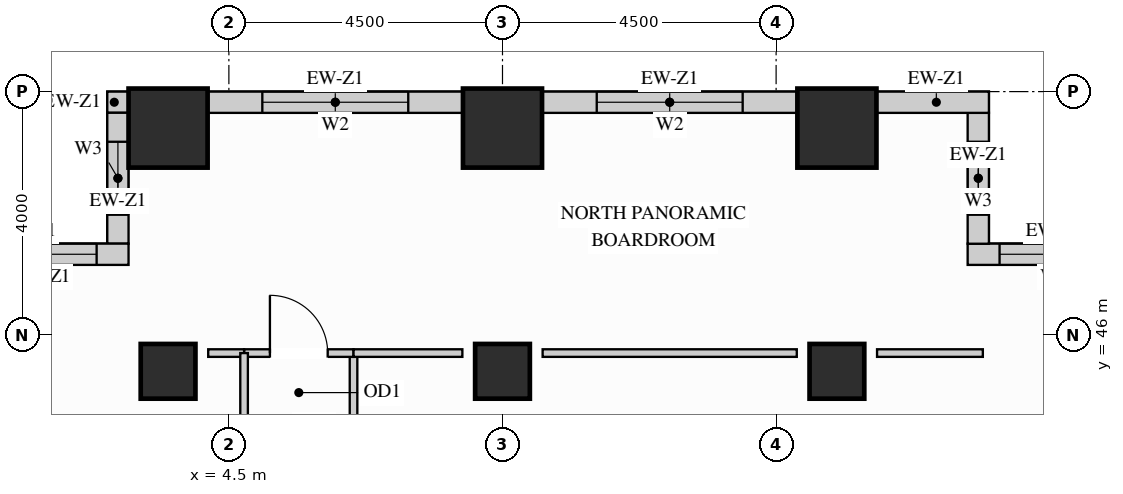
"""IFC4 building model, lengths in metres.
Left out: names, types, materials, properties, quantities, classifications, styles, units other than length and angle.
Written with IfcOpenShell. Run it as: python <this file> out.ifc"""

import sys

from ifc_helpers import new_model, si_unit, direction, frame, frame_2d, origin, origin_2d, place, context, subcontext, project, spatial, rectangle, extrude, source, transform, mapped, element, fill, save


model = new_model("IFC4")
c1 = context("Model", 3, precision=1e-05, world=origin(), true_north=direction((0.0, 1.0)))
c2 = subcontext(c1, "Body", "Model", "MODEL_VIEW")
j1 = project(units=[si_unit("LENGTHUNIT", "METRE"), si_unit("PLANEANGLEUNIT", "RADIAN")], contexts=[c1])
p1 = place(None, origin())
s1 = spatial("IfcSite", under=j1, at=p1, CompositionType="ELEMENT")
p2 = place(p1, origin())
s2 = spatial("IfcBuilding", under=s1, at=p2, CompositionType="ELEMENT")
p3 = place(p2, frame((0.0, 0.0, 65.7)))
s3 = spatial("IfcBuildingStorey", under=s2, at=p3, CompositionType="ELEMENT", Elevation=65.7)
m1 = source(origin(), c2, "Body", "SweptSolid", [
    extrude(rectangle(XDim=0.9, YDim=0.9, at=origin_2d()), origin(), (0.0, 0.0, 1.0), 3.38),
])
for number, where, z_axis, x_axis in (
    (1, (14.5, 45.4, 0.0), (0.0, 0.0, 1.0), (1.0, 0.0, 0.0)),
    (2, (3.5, 45.4, 0.0), (0.0, 0.0, 1.0), (1.0, 0.0, 0.0)),
    (3, (9.0, 45.4, 0.0), (0.0, 0.0, 1.0), (1.0, 0.0, 0.0)),
):
    element("IfcColumn", number, at=place(p3, frame(where, z_axis=z_axis, x_axis=x_axis)), inside=s3, PredefinedType="COLUMN", context=c2, shape_type="MappedRepresentation", body=[
        mapped(m1, transform((0.0, 0.0, 0.0), x_axis=(1.0, 0.0, 0.0), y_axis=(0.0, 1.0, 0.0), z_axis=(0.0, 0.0, 1.0))),
    ])
m2 = source(origin(), c2, "Body", "SweptSolid", [
    extrude(rectangle(XDim=1.3, YDim=1.3, at=origin_2d()), origin(), (0.0, 0.0, 1.0), 3.38),
])
for number, where, z_axis, x_axis in (
    (4, (14.5, 49.4, 0.0), (0.0, 0.0, 1.0), (1.0, 0.0, 0.0)),
    (5, (3.5, 49.4, 0.0), (0.0, 0.0, 1.0), (1.0, 0.0, 0.0)),
    (6, (9.0, 49.4, 0.0), (0.0, 0.0, 1.0), (1.0, 0.0, 0.0)),
):
    element("IfcColumn", number, at=place(p3, frame(where, z_axis=z_axis, x_axis=x_axis)), inside=s3, PredefinedType="COLUMN", context=c2, shape_type="MappedRepresentation", body=[
        mapped(m2, transform((0.0, 0.0, 0.0), x_axis=(1.0, 0.0, 0.0), y_axis=(0.0, 1.0, 0.0), z_axis=(0.0, 0.0, 1.0))),
    ])
p4 = place(p3, frame((19.5, 47.325, 0.0), z_axis=(0.0, 0.0, 1.0), x_axis=(-1.0, 0.0, 0.0)))
e7 = element("IfcWall", 7, at=p4, inside=s3, PredefinedType="SOLIDWALL", context=c2, shape_type="SweptSolid", body=[
    extrude(rectangle(XDim=2.85, YDim=0.35, at=frame_2d((1.425, 0.0))), origin(), (0.0, 0.0, 1.0), 3.365),
])
p5 = place(p4, frame((0.525, 0.0, 0.78)))
e8 = element("IfcOpeningElement", 8, at=p5, cuts=e7, PredefinedType="OPENING", context=c2, shape_type="SweptSolid", body=[
    extrude(rectangle(XDim=1.8, YDim=2.1, at=frame_2d((0.9, 1.05))), frame((0.0, 0.185, 0.0), z_axis=(0.0, -1.0, 0.0), x_axis=(1.0, 0.0, 0.0)), (0.0, 0.0, 1.0), 0.37),
])
p6 = place(p3, frame((16.825, 47.498, 0.0), z_axis=(0.0, 0.0, 1.0), x_axis=(0.0, 1.0, 0.0)))
e9 = element("IfcWall", 9, at=p6, inside=s3, PredefinedType="SOLIDWALL", context=c2, shape_type="SweptSolid", body=[
    extrude(rectangle(XDim=2.154, YDim=0.35, at=frame_2d((1.077, 0.0))), origin(), (0.0, 0.0, 1.0), 3.365),
])
p7 = place(p6, frame((0.477, 0.0, 0.78)))
e10 = element("IfcOpeningElement", 10, at=p7, cuts=e9, PredefinedType="OPENING", context=c2, shape_type="SweptSolid", body=[
    extrude(rectangle(XDim=1.2, YDim=2.1, at=frame_2d((0.6, 1.05))), frame((0.0, 0.185, 0.0), z_axis=(0.0, -1.0, 0.0), x_axis=(1.0, 0.0, 0.0)), (0.0, 0.0, 1.0), 0.37),
])
m3 = source(origin(), c2, "Body", "SweptSolid", [
    extrude(rectangle(XDim=1.852, YDim=0.35, at=frame_2d((0.926, 0.0))), origin(), (0.0, 0.0, 1.0), 3.365),
])
p8 = place(p3, frame((17.0, 49.825, 0.0), z_axis=(0.0, 0.0, 1.0), x_axis=(-1.0, 0.0, 0.0)))
e11 = element("IfcWall", 11, at=p8, inside=s3, PredefinedType="SOLIDWALL", context=c2, shape_type="MappedRepresentation", body=[
    mapped(m3, transform((0.0, 0.0, 0.0), x_axis=(1.0, 0.0, 0.0), y_axis=(0.0, 1.0, 0.0), z_axis=(0.0, 0.0, 1.0))),
])
p9 = place(p3, frame((13.852, 49.825, 0.0), z_axis=(0.0, 0.0, 1.0), x_axis=(-1.0, 0.0, 0.0)))
e12 = element("IfcWall", 12, at=p9, inside=s3, PredefinedType="SOLIDWALL", context=c2, shape_type="SweptSolid", body=[
    extrude(rectangle(XDim=4.204, YDim=0.35, at=frame_2d((2.102, 0.0))), origin(), (0.0, 0.0, 1.0), 2.51),
])
p10 = place(p9, frame((0.902, 0.0, 0.78)))
e13 = element("IfcOpeningElement", 13, at=p10, cuts=e12, PredefinedType="OPENING", context=c2, shape_type="SweptSolid", body=[
    extrude(rectangle(XDim=2.4, YDim=1.55, at=frame_2d((1.2, 0.775))), frame((0.0, 0.185, 0.0), z_axis=(0.0, -1.0, 0.0), x_axis=(1.0, 0.0, 0.0)), (0.0, 0.0, 1.0), 0.37),
])
p11 = place(p3, frame((8.352, 49.825, 0.0), z_axis=(0.0, 0.0, 1.0), x_axis=(-1.0, 0.0, 0.0)))
e14 = element("IfcWall", 14, at=p11, inside=s3, PredefinedType="SOLIDWALL", context=c2, shape_type="SweptSolid", body=[
    extrude(rectangle(XDim=4.204, YDim=0.35, at=frame_2d((2.102, 0.0))), origin(), (0.0, 0.0, 1.0), 2.51),
])
p12 = place(p11, frame((0.902, 0.0, 0.78)))
e15 = element("IfcOpeningElement", 15, at=p12, cuts=e14, PredefinedType="OPENING", context=c2, shape_type="SweptSolid", body=[
    extrude(rectangle(XDim=2.4, YDim=1.55, at=frame_2d((1.2, 0.775))), frame((0.0, 0.185, 0.0), z_axis=(0.0, -1.0, 0.0), x_axis=(1.0, 0.0, 0.0)), (0.0, 0.0, 1.0), 0.37),
])
m4 = source(origin(), c2, "Body", "SweptSolid", [
    extrude(rectangle(XDim=0.352, YDim=0.35, at=frame_2d((0.176, 0.0))), origin(), (0.0, 0.0, 1.0), 3.365),
])
p13 = place(p3, frame((2.852, 49.825, 0.0), z_axis=(0.0, 0.0, 1.0), x_axis=(-1.0, 0.0, 0.0)))
e16 = element("IfcWall", 16, at=p13, inside=s3, PredefinedType="SOLIDWALL", context=c2, shape_type="MappedRepresentation", body=[
    mapped(m4, transform((0.0, 0.0, 0.0), x_axis=(1.0, 0.0, 0.0), y_axis=(0.0, 1.0, 0.0), z_axis=(0.0, 0.0, 1.0))),
])
p14 = place(p3, frame((2.675, 49.652, 0.0), z_axis=(0.0, 0.0, 1.0), x_axis=(0.0, -1.0, 0.0)))
e17 = element("IfcWall", 17, at=p14, inside=s3, PredefinedType="SOLIDWALL", context=c2, shape_type="SweptSolid", body=[
    extrude(rectangle(XDim=2.154, YDim=0.35, at=frame_2d((1.077, 0.0))), origin(), (0.0, 0.0, 1.0), 3.365),
])
p15 = place(p14, frame((0.477, 0.0, 0.78)))
e18 = element("IfcOpeningElement", 18, at=p15, cuts=e17, PredefinedType="OPENING", context=c2, shape_type="SweptSolid", body=[
    extrude(rectangle(XDim=1.2, YDim=2.1, at=frame_2d((0.6, 1.05))), frame((0.0, 0.185, 0.0), z_axis=(0.0, -1.0, 0.0), x_axis=(1.0, 0.0, 0.0)), (0.0, 0.0, 1.0), 0.37),
])
p16 = place(p3, frame((2.85, 47.325, 0.0), z_axis=(0.0, 0.0, 1.0), x_axis=(-1.0, 0.0, 0.0)))
e19 = element("IfcWall", 19, at=p16, inside=s3, PredefinedType="SOLIDWALL", context=c2, shape_type="SweptSolid", body=[
    extrude(rectangle(XDim=2.85, YDim=0.35, at=frame_2d((1.425, 0.0))), origin(), (0.0, 0.0, 1.0), 3.365),
])
p17 = place(p16, frame((0.525, 0.0, 0.78)))
e20 = element("IfcOpeningElement", 20, at=p17, cuts=e19, PredefinedType="OPENING", context=c2, shape_type="SweptSolid", body=[
    extrude(rectangle(XDim=1.8, YDim=2.1, at=frame_2d((0.9, 1.05))), frame((0.0, 0.185, 0.0), z_axis=(0.0, -1.0, 0.0), x_axis=(1.0, 0.0, 0.0)), (0.0, 0.0, 1.0), 0.37),
])
p18 = place(p3, frame((6.55, 41.344, 0.0), z_axis=(0.0, 0.0, 1.0), x_axis=(0.0, 1.0, 0.0)))
e21 = element("IfcWall", 21, at=p18, inside=s3, PredefinedType="PARTITIONING", context=c2, shape_type="SweptSolid", body=[
    extrude(rectangle(XDim=4.356, YDim=0.125, at=frame_2d((2.178, 0.0))), origin(), (0.0, 0.0, 1.0), 3.365),
])
p19 = place(p18, frame((1.703, 0.0, 0.0)))
e22 = element("IfcOpeningElement", 22, at=p19, cuts=e21, PredefinedType="OPENING", context=c2, shape_type="SweptSolid", body=[
    extrude(rectangle(XDim=0.95, YDim=2.15, at=frame_2d((0.475, 1.075))), frame((0.0, 0.073, 0.0), z_axis=(0.0, -1.0, 0.0), x_axis=(1.0, 0.0, 0.0)), (0.0, 0.0, 1.0), 0.145),
])
p20 = place(p3, frame((4.75, 45.7, 0.0), z_axis=(0.0, 0.0, 1.0), x_axis=(1.0, 0.0, 0.0)))
e23 = element("IfcWall", 23, at=p20, inside=s3, PredefinedType="PARTITIONING", context=c2, shape_type="SweptSolid", body=[
    extrude(rectangle(XDim=1.8, YDim=0.125, at=frame_2d((0.9, 0.0))), origin(), (0.0, 0.0, 1.0), 2.67),
])
p21 = place(p20, frame((0.425, 0.0, 0.0)))
e24 = element("IfcOpeningElement", 24, at=p21, cuts=e23, PredefinedType="OPENING", context=c2, shape_type="SweptSolid", body=[
    extrude(rectangle(XDim=0.95, YDim=2.15, at=frame_2d((0.475, 1.075))), frame((0.0, 0.073, 0.0), z_axis=(0.0, -1.0, 0.0), x_axis=(1.0, 0.0, 0.0)), (0.0, 0.0, 1.0), 0.145),
])
m5 = source(origin(), c2, "Body", "SweptSolid", [
    extrude(rectangle(XDim=1.79, YDim=0.125, at=frame_2d((0.895, 0.0))), origin(), (0.0, 0.0, 1.0), 2.67),
])
p22 = place(p3, frame((6.55, 45.7, 0.0), z_axis=(0.0, 0.0, 1.0), x_axis=(1.0, 0.0, 0.0)))
e25 = element("IfcWall", 25, at=p22, inside=s3, PredefinedType="PARTITIONING", context=c2, shape_type="MappedRepresentation", body=[
    mapped(m5, transform((0.0, 0.0, 0.0), x_axis=(1.0, 0.0, 0.0), y_axis=(0.0, 1.0, 0.0), z_axis=(0.0, 0.0, 1.0))),
])
m6 = source(origin(), c2, "Body", "SweptSolid", [
    extrude(rectangle(XDim=4.18, YDim=0.125, at=frame_2d((2.09, 0.0))), origin(), (0.0, 0.0, 1.0), 2.67),
])
p23 = place(p3, frame((9.66, 45.7, 0.0), z_axis=(0.0, 0.0, 1.0), x_axis=(1.0, 0.0, 0.0)))
e26 = element("IfcWall", 26, at=p23, inside=s3, PredefinedType="PARTITIONING", context=c2, shape_type="MappedRepresentation", body=[
    mapped(m6, transform((0.0, 0.0, 0.0), x_axis=(1.0, 0.0, 0.0), y_axis=(0.0, 1.0, 0.0), z_axis=(0.0, 0.0, 1.0))),
])
m7 = source(origin(), c2, "Body", "SweptSolid", [
    extrude(rectangle(XDim=1.74, YDim=0.125, at=frame_2d((0.87, 0.0))), origin(), (0.0, 0.0, 1.0), 2.67),
])
p24 = place(p3, frame((15.16, 45.7, 0.0), z_axis=(0.0, 0.0, 1.0), x_axis=(1.0, 0.0, 0.0)))
e27 = element("IfcWall", 27, at=p24, inside=s3, PredefinedType="PARTITIONING", context=c2, shape_type="MappedRepresentation", body=[
    mapped(m7, transform((0.0, 0.0, 0.0), x_axis=(1.0, 0.0, 0.0), y_axis=(0.0, 1.0, 0.0), z_axis=(0.0, 0.0, 1.0))),
])
m8 = source(origin(), c2, "Body", "SweptSolid", [
    extrude(rectangle(XDim=0.59, YDim=0.125, at=frame_2d((0.295, 0.0))), origin(), (0.0, 0.0, 1.0), 2.67),
])
p25 = place(p3, frame((4.16, 45.7, 0.0), z_axis=(0.0, 0.0, 1.0), x_axis=(1.0, 0.0, 0.0)))
e28 = element("IfcWall", 28, at=p25, inside=s3, PredefinedType="PARTITIONING", context=c2, shape_type="MappedRepresentation", body=[
    mapped(m8, transform((0.0, 0.0, 0.0), x_axis=(1.0, 0.0, 0.0), y_axis=(0.0, 1.0, 0.0), z_axis=(0.0, 0.0, 1.0))),
])
p26 = place(p3, frame((4.75, 38.394, 0.0), z_axis=(0.0, 0.0, 1.0), x_axis=(0.0, 1.0, 0.0)))
e29 = element("IfcWall", 29, at=p26, inside=s3, PredefinedType="PARTITIONING", context=c2, shape_type="SweptSolid", body=[
    extrude(rectangle(XDim=7.306, YDim=0.125, at=frame_2d((3.653, 0.0))), origin(), (0.0, 0.0, 1.0), 3.365),
])
p27 = place(p26, frame((4.108, 0.0, 0.0)))
e30 = element("IfcOpeningElement", 30, at=p27, cuts=e29, PredefinedType="OPENING", context=c2, shape_type="SweptSolid", body=[
    extrude(rectangle(XDim=0.95, YDim=2.15, at=frame_2d((0.475, 1.075))), frame((0.0, 0.073, 0.0), z_axis=(0.0, -1.0, 0.0), x_axis=(1.0, 0.0, 0.0)), (0.0, 0.0, 1.0), 0.145),
])
m9 = source(origin(), c2, "Body", "SweptSolid", [
    extrude(rectangle(XDim=0.95, YDim=2.15, at=frame_2d((0.475, 1.075))), frame((0.0, 0.025, 0.0), z_axis=(0.0, -1.0, 0.0), x_axis=(1.0, 0.0, 0.0)), (0.0, 0.0, 1.0), 0.05),
])
p28 = place(p21, origin())
e31 = element("IfcDoor", 31, at=p28, inside=s3, OperationType="SINGLE_SWING_LEFT", PredefinedType="DOOR", context=c2, shape_type="MappedRepresentation", body=[
    mapped(m9, transform((0.0, 0.0, 0.0), x_axis=(1.0, 0.0, 0.0), y_axis=(0.0, 1.0, 0.0), z_axis=(0.0, 0.0, 1.0))),
])
fill(e24, e31)
m10 = source(origin(), c2, "Body", "SweptSolid", [
    extrude(rectangle(XDim=1.8, YDim=2.1, at=frame_2d((0.9, 1.05))), frame((0.0, 0.03, 0.0), z_axis=(0.0, -1.0, 0.0), x_axis=(1.0, 0.0, 0.0)), (0.0, 0.0, 1.0), 0.06),
])
p29 = place(p5, origin())
e32 = element("IfcWindow", 32, at=p29, inside=s3, PartitioningType="SINGLE_PANEL", PredefinedType="WINDOW", context=c2, shape_type="MappedRepresentation", body=[
    mapped(m10, transform((0.0, 0.0, 0.0), x_axis=(1.0, 0.0, 0.0), y_axis=(0.0, 1.0, 0.0), z_axis=(0.0, 0.0, 1.0))),
])
fill(e8, e32)
p30 = place(p17, origin())
e33 = element("IfcWindow", 33, at=p30, inside=s3, PartitioningType="SINGLE_PANEL", PredefinedType="WINDOW", context=c2, shape_type="MappedRepresentation", body=[
    mapped(m10, transform((0.0, 0.0, 0.0), x_axis=(1.0, 0.0, 0.0), y_axis=(0.0, 1.0, 0.0), z_axis=(0.0, 0.0, 1.0))),
])
fill(e20, e33)
m11 = source(origin(), c2, "Body", "SweptSolid", [
    extrude(rectangle(XDim=2.4, YDim=1.55, at=frame_2d((1.2, 0.775))), frame((0.0, 0.03, 0.0), z_axis=(0.0, -1.0, 0.0), x_axis=(1.0, 0.0, 0.0)), (0.0, 0.0, 1.0), 0.06),
])
p31 = place(p10, origin())
e34 = element("IfcWindow", 34, at=p31, inside=s3, PartitioningType="SINGLE_PANEL", PredefinedType="WINDOW", context=c2, shape_type="MappedRepresentation", body=[
    mapped(m11, transform((0.0, 0.0, 0.0), x_axis=(1.0, 0.0, 0.0), y_axis=(0.0, 1.0, 0.0), z_axis=(0.0, 0.0, 1.0))),
])
fill(e13, e34)
p32 = place(p12, origin())
e35 = element("IfcWindow", 35, at=p32, inside=s3, PartitioningType="SINGLE_PANEL", PredefinedType="WINDOW", context=c2, shape_type="MappedRepresentation", body=[
    mapped(m11, transform((0.0, 0.0, 0.0), x_axis=(1.0, 0.0, 0.0), y_axis=(0.0, 1.0, 0.0), z_axis=(0.0, 0.0, 1.0))),
])
fill(e15, e35)
m12 = source(origin(), c2, "Body", "SweptSolid", [
    extrude(rectangle(XDim=1.2, YDim=2.1, at=frame_2d((0.6, 1.05))), frame((0.0, 0.03, 0.0), z_axis=(0.0, -1.0, 0.0), x_axis=(1.0, 0.0, 0.0)), (0.0, 0.0, 1.0), 0.06),
])
p33 = place(p7, origin())
e36 = element("IfcWindow", 36, at=p33, inside=s3, PartitioningType="SINGLE_PANEL", PredefinedType="WINDOW", context=c2, shape_type="MappedRepresentation", body=[
    mapped(m12, transform((0.0, 0.0, 0.0), x_axis=(1.0, 0.0, 0.0), y_axis=(0.0, 1.0, 0.0), z_axis=(0.0, 0.0, 1.0))),
])
fill(e10, e36)
p34 = place(p15, origin())
e37 = element("IfcWindow", 37, at=p34, inside=s3, PartitioningType="SINGLE_PANEL", PredefinedType="WINDOW", context=c2, shape_type="MappedRepresentation", body=[
    mapped(m12, transform((0.0, 0.0, 0.0), x_axis=(1.0, 0.0, 0.0), y_axis=(0.0, 1.0, 0.0), z_axis=(0.0, 0.0, 1.0))),
])
fill(e18, e37)
save(model, sys.argv[1])
